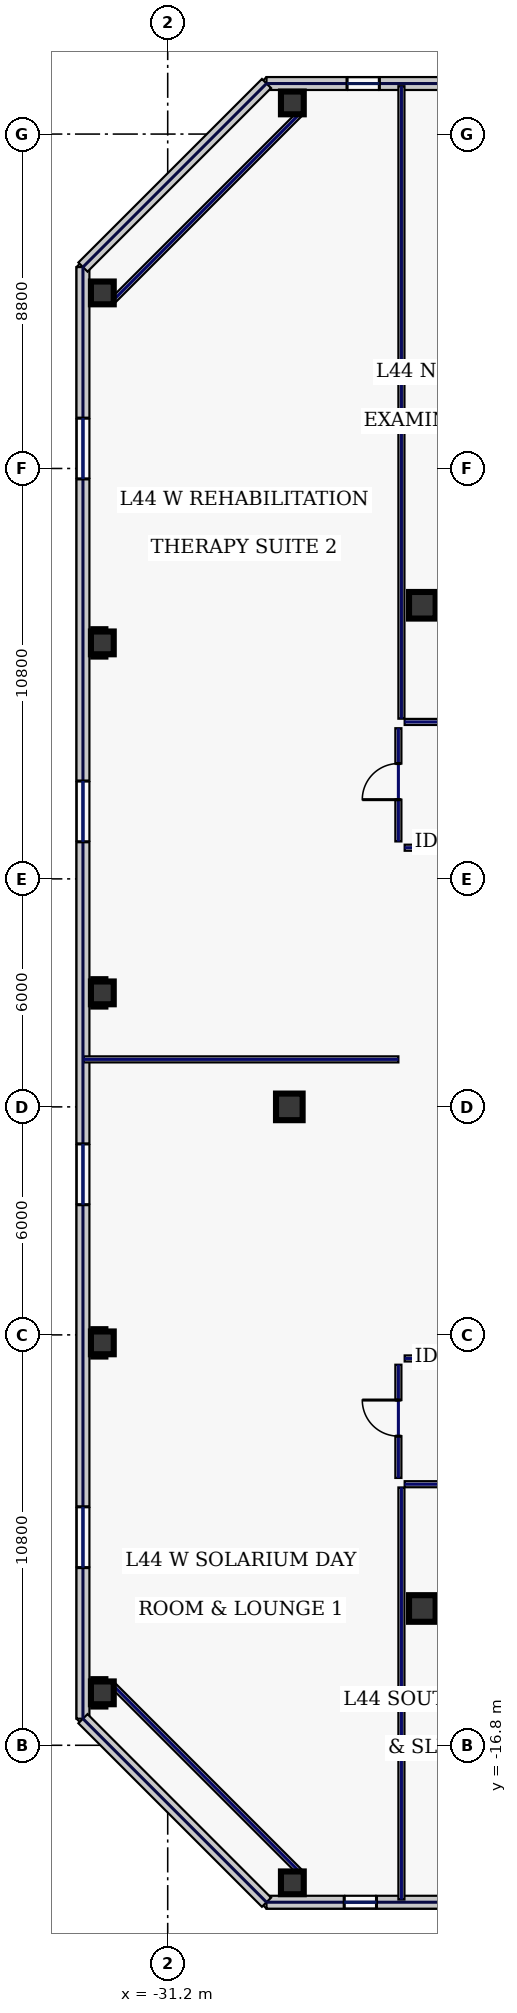
"""IFC4 building model, lengths in metres.
Left out: names, types, materials, properties, quantities, classifications, styles, units other than length and angle.
Written with IfcOpenShell. Run it as: python <this file> out.ifc"""

import sys

from ifc_helpers import new_model, si_unit, direction, frame, frame_2d, origin, origin_2d, place, context, subcontext, project, spatial, rectangle, hollow_rectangle, extrude, element, fill, save


model = new_model("IFC4")
c1 = context("Model", 3, precision=1e-05, world=origin(), true_north=direction((0.0, 1.0)))
c2 = subcontext(c1, "Body", "Model", "MODEL_VIEW")
j1 = project(units=[si_unit("LENGTHUNIT", "METRE"), si_unit("PLANEANGLEUNIT", "RADIAN")], contexts=[c1])
p1 = place(None, origin())
s1 = spatial("IfcSite", under=j1, at=p1, CompositionType="ELEMENT")
p2 = place(p1, origin())
s2 = spatial("IfcBuilding", under=s1, at=p2, CompositionType="ELEMENT")
p3 = place(p2, frame((0.0, 0.0, 192.2)))
s3 = spatial("IfcBuildingStorey", under=s2, at=p3, CompositionType="ELEMENT", Elevation=192.2)
for number, where, z_axis, x_axis in (
    (1, (-24.5, -13.2, 0.0), (0.0, 0.0, 1.0), (1.0, 0.0, 0.0)),
    (2, (-24.5, 13.2, 0.0), (0.0, 0.0, 1.0), (1.0, 0.0, 0.0)),
    (3, (-28.0, 0.0, 0.0), (0.0, 0.0, 1.0), (1.0, 0.0, 0.0)),
):
    element("IfcColumn", number, at=place(p3, frame(where, z_axis=z_axis, x_axis=x_axis)), inside=s3, PredefinedType="COLUMN", context=c2, shape_type="SweptSolid", body=[
        extrude(hollow_rectangle(XDim=0.7, YDim=0.7, WallThickness=0.032, at=origin_2d()), origin(), (0.0, 0.0, 1.0), 3.74),
    ])
for number, where, z_axis, x_axis in (
    (4, (-27.92, -20.42, 0.0), (0.0, 0.0, 1.0), (1.0, 0.0, 0.0)),
    (5, (-27.92, 26.42, 0.0), (0.0, 0.0, 1.0), (1.0, 0.0, 0.0)),
    (6, (-32.92, 21.42, 0.0), (0.0, 0.0, 1.0), (1.0, 0.0, 0.0)),
    (7, (-32.92, 12.21, 0.0), (0.0, 0.0, 1.0), (1.0, 0.0, 0.0)),
    (8, (-32.92, 3.0, 0.0), (0.0, 0.0, 1.0), (1.0, 0.0, 0.0)),
    (9, (-32.92, -6.21, 0.0), (0.0, 0.0, 1.0), (1.0, 0.0, 0.0)),
    (10, (-32.92, -15.42, 0.0), (0.0, 0.0, 1.0), (1.0, 0.0, 0.0)),
):
    element("IfcColumn", number, at=place(p3, frame(where, z_axis=z_axis, x_axis=x_axis)), inside=s3, PredefinedType="COLUMN", context=c2, shape_type="SweptSolid", body=[
        extrude(hollow_rectangle(XDim=0.6, YDim=0.6, WallThickness=0.028, at=origin_2d()), origin(), (0.0, 0.0, 1.0), 3.74),
    ])
p4 = place(p3, frame((-28.6, -20.93, 0.0), z_axis=(0.0, 0.0, 1.0), x_axis=(1.0, 0.0, 0.0)))
e11 = element("IfcWall", 11, at=p4, inside=s3, PredefinedType="STANDARD", context=c2, shape_type="SweptSolid", body=[
    extrude(rectangle(XDim=19.937, YDim=0.34, at=frame_2d((9.969, 0.0))), origin(), (0.0, 0.0, 1.0), 3.74),
])
p5 = place(p4, frame((2.044, 0.0, 0.8)))
e12 = element("IfcOpeningElement", 12, at=p5, cuts=e11, PredefinedType="OPENING", context=c2, shape_type="SweptSolid", body=[
    extrude(rectangle(XDim=0.85, YDim=1.85, at=frame_2d((0.425, 0.925))), frame((0.0, 0.18, 0.0), z_axis=(0.0, -1.0, 0.0), x_axis=(1.0, 0.0, 0.0)), (0.0, 0.0, 1.0), 0.36),
])
p6 = place(p4, frame((6.029, 0.0, 0.8)))
e13 = element("IfcOpeningElement", 13, at=p6, cuts=e11, PredefinedType="OPENING", context=c2, shape_type="SweptSolid", body=[
    extrude(rectangle(XDim=0.85, YDim=1.85, at=frame_2d((0.425, 0.925))), frame((0.0, 0.18, 0.0), z_axis=(0.0, -1.0, 0.0), x_axis=(1.0, 0.0, 0.0)), (0.0, 0.0, 1.0), 0.36),
])
p7 = place(p4, frame((10.707, 0.0, 0.8)))
e14 = element("IfcOpeningElement", 14, at=p7, cuts=e11, PredefinedType="OPENING", context=c2, shape_type="SweptSolid", body=[
    extrude(rectangle(XDim=1.95, YDim=2.1, at=frame_2d((0.975, 1.05))), frame((0.0, 0.18, 0.0), z_axis=(0.0, -1.0, 0.0), x_axis=(1.0, 0.0, 0.0)), (0.0, 0.0, 1.0), 0.36),
])
p8 = place(p3, frame((-8.663, 26.93, 0.0), z_axis=(0.0, 0.0, 1.0), x_axis=(-1.0, 0.0, 0.0)))
e15 = element("IfcWall", 15, at=p8, inside=s3, PredefinedType="STANDARD", context=c2, shape_type="SweptSolid", body=[
    extrude(rectangle(XDim=19.937, YDim=0.34, at=frame_2d((9.969, 0.0))), origin(), (0.0, 0.0, 1.0), 3.74),
])
p9 = place(p8, frame((16.968, 0.0, 0.7)))
e16 = element("IfcOpeningElement", 16, at=p9, cuts=e15, PredefinedType="OPENING", context=c2, shape_type="SweptSolid", body=[
    extrude(rectangle(XDim=0.85, YDim=1.85, at=frame_2d((0.425, 0.925))), frame((0.0, 0.18, 0.0), z_axis=(0.0, -1.0, 0.0), x_axis=(1.0, 0.0, 0.0)), (0.0, 0.0, 1.0), 0.36),
])
p10 = place(p8, frame((12.983, 0.0, 0.7)))
e17 = element("IfcOpeningElement", 17, at=p10, cuts=e15, PredefinedType="OPENING", context=c2, shape_type="SweptSolid", body=[
    extrude(rectangle(XDim=0.85, YDim=1.85, at=frame_2d((0.425, 0.925))), frame((0.0, 0.18, 0.0), z_axis=(0.0, -1.0, 0.0), x_axis=(1.0, 0.0, 0.0)), (0.0, 0.0, 1.0), 0.36),
])
p11 = place(p8, frame((7.355, 0.0, 0.7)))
e18 = element("IfcOpeningElement", 18, at=p11, cuts=e15, PredefinedType="OPENING", context=c2, shape_type="SweptSolid", body=[
    extrude(rectangle(XDim=1.8, YDim=2.2, at=frame_2d((0.9, 1.1))), frame((0.0, 0.18, 0.0), z_axis=(0.0, -1.0, 0.0), x_axis=(1.0, 0.0, 0.0)), (0.0, 0.0, 1.0), 0.36),
])
p12 = place(p3, frame((-33.43, 22.1, 0.0), z_axis=(0.0, 0.0, 1.0), x_axis=(0.0, -1.0, 0.0)))
e19 = element("IfcWall", 19, at=p12, inside=s3, PredefinedType="STANDARD", context=c2, shape_type="SweptSolid", body=[
    extrude(rectangle(XDim=38.2, YDim=0.34, at=frame_2d((19.1, 0.0))), origin(), (0.0, 0.0, 1.0), 3.74),
])
p13 = place(p12, frame((3.975, 0.0, 0.58)))
e20 = element("IfcOpeningElement", 20, at=p13, cuts=e19, PredefinedType="OPENING", context=c2, shape_type="SweptSolid", body=[
    extrude(rectangle(XDim=1.6, YDim=2.3, at=frame_2d((0.8, 1.15))), frame((0.0, 0.18, 0.0), z_axis=(0.0, -1.0, 0.0), x_axis=(1.0, 0.0, 0.0)), (0.0, 0.0, 1.0), 0.36),
])
p14 = place(p12, frame((13.525, 0.0, 0.58)))
e21 = element("IfcOpeningElement", 21, at=p14, cuts=e19, PredefinedType="OPENING", context=c2, shape_type="SweptSolid", body=[
    extrude(rectangle(XDim=1.6, YDim=2.3, at=frame_2d((0.8, 1.15))), frame((0.0, 0.18, 0.0), z_axis=(0.0, -1.0, 0.0), x_axis=(1.0, 0.0, 0.0)), (0.0, 0.0, 1.0), 0.36),
])
p15 = place(p12, frame((23.075, 0.0, 0.58)))
e22 = element("IfcOpeningElement", 22, at=p15, cuts=e19, PredefinedType="OPENING", context=c2, shape_type="SweptSolid", body=[
    extrude(rectangle(XDim=1.6, YDim=2.3, at=frame_2d((0.8, 1.15))), frame((0.0, 0.18, 0.0), z_axis=(0.0, -1.0, 0.0), x_axis=(1.0, 0.0, 0.0)), (0.0, 0.0, 1.0), 0.36),
])
p16 = place(p12, frame((32.625, 0.0, 0.58)))
e23 = element("IfcOpeningElement", 23, at=p16, cuts=e19, PredefinedType="OPENING", context=c2, shape_type="SweptSolid", body=[
    extrude(rectangle(XDim=1.6, YDim=2.3, at=frame_2d((0.8, 1.15))), frame((0.0, 0.18, 0.0), z_axis=(0.0, -1.0, 0.0), x_axis=(1.0, 0.0, 0.0)), (0.0, 0.0, 1.0), 0.36),
])
for number, where, z_axis, x_axis in (
    (24, (-28.6, 26.93, 0.0), (0.0, 0.0, 1.0), (-0.707, -0.707, 0.0)),
    (25, (-33.43, -16.1, 0.0), (0.0, 0.0, 1.0), (0.707, -0.707, 0.0)),
):
    element("IfcWall", number, at=place(p3, frame(where, z_axis=z_axis, x_axis=x_axis)), inside=s3, PredefinedType="STANDARD", context=c2, shape_type="SweptSolid", body=[
        extrude(rectangle(XDim=6.83, YDim=0.34, at=frame_2d((3.415, 0.0))), origin(), (0.0, 0.0, 1.0), 3.74),
    ])
for number, where, z_axis, x_axis in (
    (26, (-27.68, 26.18, 0.0), (0.0, 0.0, 1.0), (-0.707, -0.707, 0.0)),
    (27, (-32.68, -15.18, 0.0), (0.0, 0.0, 1.0), (0.707, -0.707, 0.0)),
):
    element("IfcWall", number, at=place(p3, frame(where, z_axis=z_axis, x_axis=x_axis)), inside=s3, PredefinedType="PARTITIONING", context=c2, shape_type="SweptSolid", body=[
        extrude(rectangle(XDim=7.071, YDim=0.16, at=frame_2d((3.536, 0.0))), origin(), (0.0, 0.0, 1.0), 3.74),
    ])
p17 = place(p3, frame((-25.13, -9.765, 0.0), z_axis=(0.0, 0.0, 1.0), x_axis=(0.0, 1.0, 0.0)))
e28 = element("IfcWall", 28, at=p17, inside=s3, PredefinedType="PARTITIONING", context=c2, shape_type="SweptSolid", body=[
    extrude(rectangle(XDim=2.98, YDim=0.16, at=frame_2d((1.49, 0.0))), origin(), (0.0, 0.0, 1.0), 3.74),
])
p18 = place(p17, frame((1.1, 0.0, 0.0)))
e29 = element("IfcOpeningElement", 29, at=p18, cuts=e28, PredefinedType="OPENING", context=c2, shape_type="SweptSolid", body=[
    extrude(rectangle(XDim=0.95, YDim=2.2, at=frame_2d((0.475, 1.1))), frame((0.0, 0.09, 0.0), z_axis=(0.0, -1.0, 0.0), x_axis=(1.0, 0.0, 0.0)), (0.0, 0.0, 1.0), 0.18),
])
for number, where, z_axis, x_axis in (
    (30, (-24.965, -6.62, 0.0), (0.0, 0.0, 1.0), (1.0, 0.0, 0.0)),
    (31, (-10.63, 6.82, 0.0), (0.0, 0.0, 1.0), (-1.0, 0.0, 0.0)),
):
    element("IfcWall", number, at=place(p3, frame(where, z_axis=z_axis, x_axis=x_axis)), inside=s3, PredefinedType="PARTITIONING", context=c2, shape_type="SweptSolid", body=[
        extrude(rectangle(XDim=14.335, YDim=0.16, at=frame_2d((7.167, 0.0))), origin(), (0.0, 0.0, 1.0), 3.74),
    ])
p19 = place(p3, frame((-25.13, 6.985, 0.0), z_axis=(0.0, 0.0, 1.0), x_axis=(0.0, 1.0, 0.0)))
e32 = element("IfcWall", 32, at=p19, inside=s3, PredefinedType="PARTITIONING", context=c2, shape_type="SweptSolid", body=[
    extrude(rectangle(XDim=2.98, YDim=0.16, at=frame_2d((1.49, 0.0))), origin(), (0.0, 0.0, 1.0), 3.74),
])
p20 = place(p19, frame((1.1, 0.0, 0.0)))
e33 = element("IfcOpeningElement", 33, at=p20, cuts=e32, PredefinedType="OPENING", context=c2, shape_type="SweptSolid", body=[
    extrude(rectangle(XDim=0.95, YDim=2.2, at=frame_2d((0.475, 1.1))), frame((0.0, 0.09, 0.0), z_axis=(0.0, -1.0, 0.0), x_axis=(1.0, 0.0, 0.0)), (0.0, 0.0, 1.0), 0.18),
])
p21 = place(p3, frame((-24.965, 10.13, 0.0), z_axis=(0.0, 0.0, 1.0), x_axis=(1.0, 0.0, 0.0)))
e34 = element("IfcWall", 34, at=p21, inside=s3, PredefinedType="PARTITIONING", context=c2, shape_type="SweptSolid", body=[
    extrude(rectangle(XDim=49.93, YDim=0.16, at=frame_2d((24.965, 0.0))), origin(), (0.0, 0.0, 1.0), 3.74),
])
p22 = place(p21, frame((2.044, 0.0, 0.0)))
e35 = element("IfcOpeningElement", 35, at=p22, cuts=e34, PredefinedType="OPENING", context=c2, shape_type="SweptSolid", body=[
    extrude(rectangle(XDim=0.95, YDim=2.2, at=frame_2d((0.475, 1.1))), frame((0.0, 0.09, 0.0), z_axis=(0.0, -1.0, 0.0), x_axis=(1.0, 0.0, 0.0)), (0.0, 0.0, 1.0), 0.18),
])
p23 = place(p21, frame((7.775, 0.0, 0.0)))
e36 = element("IfcOpeningElement", 36, at=p23, cuts=e34, PredefinedType="OPENING", context=c2, shape_type="SweptSolid", body=[
    extrude(rectangle(XDim=0.95, YDim=2.2, at=frame_2d((0.475, 1.1))), frame((0.0, 0.09, 0.0), z_axis=(0.0, -1.0, 0.0), x_axis=(1.0, 0.0, 0.0)), (0.0, 0.0, 1.0), 0.18),
])
p24 = place(p21, frame((15.275, 0.0, 0.0)))
e37 = element("IfcOpeningElement", 37, at=p24, cuts=e34, PredefinedType="OPENING", context=c2, shape_type="SweptSolid", body=[
    extrude(rectangle(XDim=0.95, YDim=2.2, at=frame_2d((0.475, 1.1))), frame((0.0, 0.09, 0.0), z_axis=(0.0, -1.0, 0.0), x_axis=(1.0, 0.0, 0.0)), (0.0, 0.0, 1.0), 0.18),
])
p25 = place(p21, frame((21.475, 0.0, 0.0)))
e38 = element("IfcOpeningElement", 38, at=p25, cuts=e34, PredefinedType="OPENING", context=c2, shape_type="SweptSolid", body=[
    extrude(rectangle(XDim=1.3, YDim=2.2, at=frame_2d((0.65, 1.1))), frame((0.0, 0.09, 0.0), z_axis=(0.0, -1.0, 0.0), x_axis=(1.0, 0.0, 0.0)), (0.0, 0.0, 1.0), 0.18),
])
p26 = place(p21, frame((26.15, 0.0, 0.0)))
e39 = element("IfcOpeningElement", 39, at=p26, cuts=e34, PredefinedType="OPENING", context=c2, shape_type="SweptSolid", body=[
    extrude(rectangle(XDim=0.95, YDim=2.2, at=frame_2d((0.475, 1.1))), frame((0.0, 0.09, 0.0), z_axis=(0.0, -1.0, 0.0), x_axis=(1.0, 0.0, 0.0)), (0.0, 0.0, 1.0), 0.18),
])
p27 = place(p21, frame((32.575, 0.0, 0.0)))
e40 = element("IfcOpeningElement", 40, at=p27, cuts=e34, PredefinedType="OPENING", context=c2, shape_type="SweptSolid", body=[
    extrude(rectangle(XDim=0.95, YDim=2.2, at=frame_2d((0.475, 1.1))), frame((0.0, 0.09, 0.0), z_axis=(0.0, -1.0, 0.0), x_axis=(1.0, 0.0, 0.0)), (0.0, 0.0, 1.0), 0.18),
])
p28 = place(p21, frame((40.675, 0.0, 0.0)))
e41 = element("IfcOpeningElement", 41, at=p28, cuts=e34, PredefinedType="OPENING", context=c2, shape_type="SweptSolid", body=[
    extrude(rectangle(XDim=0.95, YDim=2.2, at=frame_2d((0.475, 1.1))), frame((0.0, 0.09, 0.0), z_axis=(0.0, -1.0, 0.0), x_axis=(1.0, 0.0, 0.0)), (0.0, 0.0, 1.0), 0.18),
])
p29 = place(p21, frame((46.631, 0.0, 0.0)))
e42 = element("IfcOpeningElement", 42, at=p29, cuts=e34, PredefinedType="OPENING", context=c2, shape_type="SweptSolid", body=[
    extrude(rectangle(XDim=1.3, YDim=2.2, at=frame_2d((0.65, 1.1))), frame((0.0, 0.09, 0.0), z_axis=(0.0, -1.0, 0.0), x_axis=(1.0, 0.0, 0.0)), (0.0, 0.0, 1.0), 0.18),
])
p30 = place(p3, frame((24.965, -9.93, 0.0), z_axis=(0.0, 0.0, 1.0), x_axis=(-1.0, 0.0, 0.0)))
e43 = element("IfcWall", 43, at=p30, inside=s3, PredefinedType="PARTITIONING", context=c2, shape_type="SweptSolid", body=[
    extrude(rectangle(XDim=49.93, YDim=0.16, at=frame_2d((24.965, 0.0))), origin(), (0.0, 0.0, 1.0), 3.74),
])
p31 = place(p30, frame((47.106, 0.0, 0.0)))
e44 = element("IfcOpeningElement", 44, at=p31, cuts=e43, PredefinedType="OPENING", context=c2, shape_type="SweptSolid", body=[
    extrude(rectangle(XDim=0.95, YDim=2.2, at=frame_2d((0.475, 1.1))), frame((0.0, 0.09, 0.0), z_axis=(0.0, -1.0, 0.0), x_axis=(1.0, 0.0, 0.0)), (0.0, 0.0, 1.0), 0.18),
])
p32 = place(p30, frame((41.375, 0.0, 0.0)))
e45 = element("IfcOpeningElement", 45, at=p32, cuts=e43, PredefinedType="OPENING", context=c2, shape_type="SweptSolid", body=[
    extrude(rectangle(XDim=0.95, YDim=2.2, at=frame_2d((0.475, 1.1))), frame((0.0, 0.09, 0.0), z_axis=(0.0, -1.0, 0.0), x_axis=(1.0, 0.0, 0.0)), (0.0, 0.0, 1.0), 0.18),
])
p33 = place(p30, frame((33.875, 0.0, 0.0)))
e46 = element("IfcOpeningElement", 46, at=p33, cuts=e43, PredefinedType="OPENING", context=c2, shape_type="SweptSolid", body=[
    extrude(rectangle(XDim=0.95, YDim=2.2, at=frame_2d((0.475, 1.1))), frame((0.0, 0.09, 0.0), z_axis=(0.0, -1.0, 0.0), x_axis=(1.0, 0.0, 0.0)), (0.0, 0.0, 1.0), 0.18),
])
p34 = place(p30, frame((25.3, 0.0, 0.0)))
e47 = element("IfcOpeningElement", 47, at=p34, cuts=e43, PredefinedType="OPENING", context=c2, shape_type="SweptSolid", body=[
    extrude(rectangle(XDim=1.3, YDim=2.2, at=frame_2d((0.65, 1.1))), frame((0.0, 0.09, 0.0), z_axis=(0.0, -1.0, 0.0), x_axis=(1.0, 0.0, 0.0)), (0.0, 0.0, 1.0), 0.18),
])
p35 = place(p30, frame((16.4, 0.0, 0.0)))
e48 = element("IfcOpeningElement", 48, at=p35, cuts=e43, PredefinedType="OPENING", context=c2, shape_type="SweptSolid", body=[
    extrude(rectangle(XDim=1.3, YDim=2.2, at=frame_2d((0.65, 1.1))), frame((0.0, 0.09, 0.0), z_axis=(0.0, -1.0, 0.0), x_axis=(1.0, 0.0, 0.0)), (0.0, 0.0, 1.0), 0.18),
])
p36 = place(p30, frame((8.475, 0.0, 0.0)))
e49 = element("IfcOpeningElement", 49, at=p36, cuts=e43, PredefinedType="OPENING", context=c2, shape_type="SweptSolid", body=[
    extrude(rectangle(XDim=0.95, YDim=2.2, at=frame_2d((0.475, 1.1))), frame((0.0, 0.09, 0.0), z_axis=(0.0, -1.0, 0.0), x_axis=(1.0, 0.0, 0.0)), (0.0, 0.0, 1.0), 0.18),
])
p37 = place(p30, frame((2.344, 0.0, 0.0)))
e50 = element("IfcOpeningElement", 50, at=p37, cuts=e43, PredefinedType="OPENING", context=c2, shape_type="SweptSolid", body=[
    extrude(rectangle(XDim=0.95, YDim=2.2, at=frame_2d((0.475, 1.1))), frame((0.0, 0.09, 0.0), z_axis=(0.0, -1.0, 0.0), x_axis=(1.0, 0.0, 0.0)), (0.0, 0.0, 1.0), 0.18),
])
p38 = place(p3, frame((-25.05, 10.215, 0.0), z_axis=(0.0, 0.0, 1.0), x_axis=(0.0, 1.0, 0.0)))
e51 = element("IfcWall", 51, at=p38, inside=s3, PredefinedType="PARTITIONING", context=c2, shape_type="SweptSolid", body=[
    extrude(rectangle(XDim=16.645, YDim=0.16, at=frame_2d((8.323, 0.0))), origin(), (0.0, 0.0, 1.0), 3.285),
])
p39 = place(p3, frame((-25.05, -20.86, 0.0), z_axis=(0.0, 0.0, 1.0), x_axis=(0.0, 1.0, 0.0)))
e52 = element("IfcWall", 52, at=p39, inside=s3, PredefinedType="PARTITIONING", context=c2, shape_type="SweptSolid", body=[
    extrude(rectangle(XDim=10.845, YDim=0.16, at=frame_2d((5.423, 0.0))), origin(), (0.0, 0.0, 1.0), 3.74),
])
p40 = place(p3, frame((-33.41, 1.25, 0.0), z_axis=(0.0, 0.0, 1.0), x_axis=(1.0, 0.0, 0.0)))
e53 = element("IfcWall", 53, at=p40, inside=s3, PredefinedType="PARTITIONING", context=c2, shape_type="SweptSolid", body=[
    extrude(rectangle(XDim=8.28, YDim=0.16, at=frame_2d((4.14, 0.0))), origin(), (0.0, 0.0, 1.0), 3.74),
])
p41 = place(p5, origin())
e54 = element("IfcWindow", 54, at=p41, inside=s3, PartitioningType="SINGLE_PANEL", PredefinedType="WINDOW", context=c2, shape_type="SweptSolid", body=[
    extrude(rectangle(XDim=0.85, YDim=1.85, at=frame_2d((0.425, 0.925))), frame((0.0, 0.03, 0.0), z_axis=(0.0, -1.0, 0.0), x_axis=(1.0, 0.0, 0.0)), (0.0, 0.0, 1.0), 0.06),
])
fill(e12, e54)
p42 = place(p9, origin())
e55 = element("IfcWindow", 55, at=p42, inside=s3, PartitioningType="SINGLE_PANEL", PredefinedType="WINDOW", context=c2, shape_type="SweptSolid", body=[
    extrude(rectangle(XDim=0.85, YDim=1.85, at=frame_2d((0.425, 0.925))), frame((0.0, 0.03, 0.0), z_axis=(0.0, -1.0, 0.0), x_axis=(1.0, 0.0, 0.0)), (0.0, 0.0, 1.0), 0.06),
])
fill(e16, e55)
p43 = place(p13, origin())
e56 = element("IfcWindow", 56, at=p43, inside=s3, PartitioningType="SINGLE_PANEL", PredefinedType="WINDOW", context=c2, shape_type="SweptSolid", body=[
    extrude(rectangle(XDim=1.6, YDim=2.3, at=frame_2d((0.8, 1.15))), frame((0.0, 0.03, 0.0), z_axis=(0.0, -1.0, 0.0), x_axis=(1.0, 0.0, 0.0)), (0.0, 0.0, 1.0), 0.06),
])
fill(e20, e56)
p44 = place(p14, origin())
e57 = element("IfcWindow", 57, at=p44, inside=s3, PartitioningType="SINGLE_PANEL", PredefinedType="WINDOW", context=c2, shape_type="SweptSolid", body=[
    extrude(rectangle(XDim=1.6, YDim=2.3, at=frame_2d((0.8, 1.15))), frame((0.0, 0.03, 0.0), z_axis=(0.0, -1.0, 0.0), x_axis=(1.0, 0.0, 0.0)), (0.0, 0.0, 1.0), 0.06),
])
fill(e21, e57)
p45 = place(p15, origin())
e58 = element("IfcWindow", 58, at=p45, inside=s3, PartitioningType="SINGLE_PANEL", PredefinedType="WINDOW", context=c2, shape_type="SweptSolid", body=[
    extrude(rectangle(XDim=1.6, YDim=2.3, at=frame_2d((0.8, 1.15))), frame((0.0, 0.03, 0.0), z_axis=(0.0, -1.0, 0.0), x_axis=(1.0, 0.0, 0.0)), (0.0, 0.0, 1.0), 0.06),
])
fill(e22, e58)
p46 = place(p16, origin())
e59 = element("IfcWindow", 59, at=p46, inside=s3, PartitioningType="SINGLE_PANEL", PredefinedType="WINDOW", context=c2, shape_type="SweptSolid", body=[
    extrude(rectangle(XDim=1.6, YDim=2.3, at=frame_2d((0.8, 1.15))), frame((0.0, 0.03, 0.0), z_axis=(0.0, -1.0, 0.0), x_axis=(1.0, 0.0, 0.0)), (0.0, 0.0, 1.0), 0.06),
])
fill(e23, e59)
p47 = place(p18, origin())
e60 = element("IfcDoor", 60, at=p47, inside=s3, OperationType="SINGLE_SWING_RIGHT", PredefinedType="DOOR", context=c2, shape_type="SweptSolid", body=[
    extrude(rectangle(XDim=0.95, YDim=2.2, at=frame_2d((0.475, 1.1))), frame((0.0, 0.025, 0.0), z_axis=(0.0, -1.0, 0.0), x_axis=(1.0, 0.0, 0.0)), (0.0, 0.0, 1.0), 0.05),
])
fill(e29, e60)
p48 = place(p20, origin())
e61 = element("IfcDoor", 61, at=p48, inside=s3, OperationType="SINGLE_SWING_LEFT", PredefinedType="DOOR", context=c2, shape_type="SweptSolid", body=[
    extrude(rectangle(XDim=0.95, YDim=2.2, at=frame_2d((0.475, 1.1))), frame((0.0, 0.025, 0.0), z_axis=(0.0, -1.0, 0.0), x_axis=(1.0, 0.0, 0.0)), (0.0, 0.0, 1.0), 0.05),
])
fill(e33, e61)
save(model, sys.argv[1])
